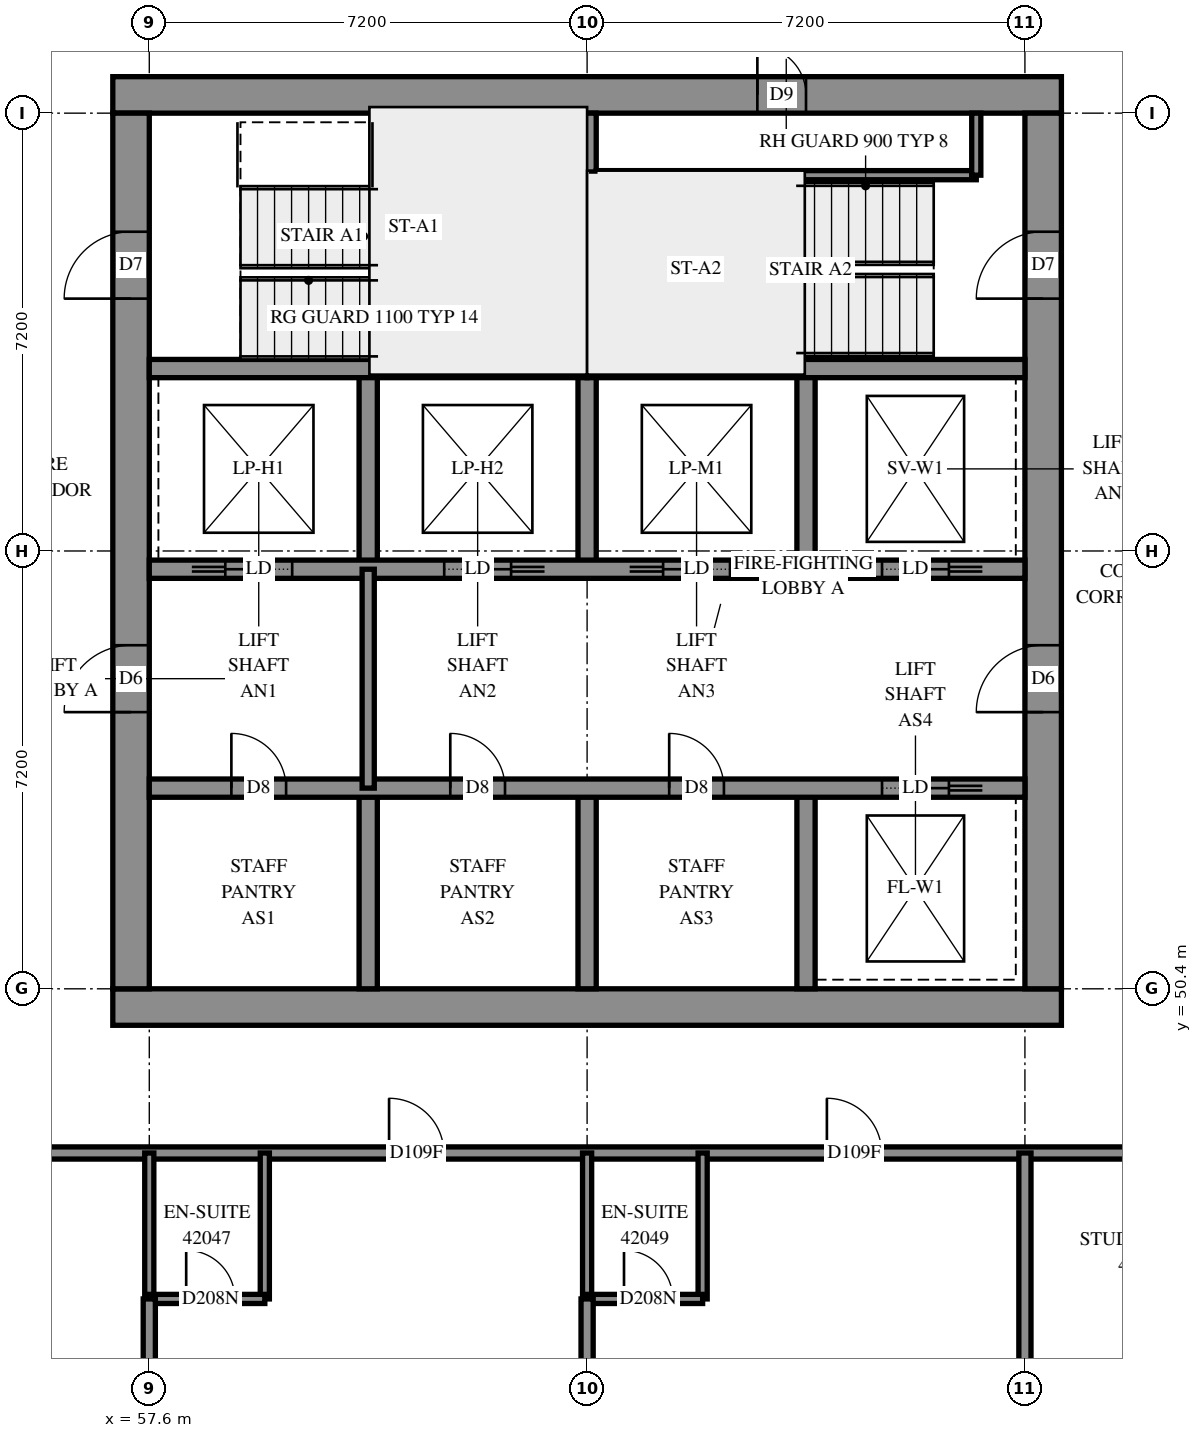
"""IFC4 building model, lengths in metres.
Left out: names, types, materials, properties, quantities, classifications, styles, units other than length and angle.
Written with IfcOpenShell. Run it as: python <this file> out.ifc"""

import sys

from ifc_helpers import new_model, si_unit, direction, frame, frame_2d, origin, place, context, subcontext, project, spatial, rectangle, extrude, element, fill, save


model = new_model("IFC4")
c1 = context("Model", 3, precision=1e-05, world=origin(), true_north=direction((0.0, 1.0)))
c2 = subcontext(c1, "Body", "Model", "MODEL_VIEW")
j1 = project(units=[si_unit("LENGTHUNIT", "METRE"), si_unit("PLANEANGLEUNIT", "RADIAN")], contexts=[c1])
p1 = place(None, origin())
s1 = spatial("IfcSite", under=j1, at=p1, CompositionType="ELEMENT")
p2 = place(p1, origin())
s2 = spatial("IfcBuilding", under=s1, at=p2, CompositionType="ELEMENT")
p3 = place(p2, frame((0.0, 0.0, 155.8)))
s3 = spatial("IfcBuildingStorey", under=s2, at=p3, CompositionType="ELEMENT", Elevation=155.8)
p4 = place(p3, frame((57.0, 50.1, -0.3), z_axis=(0.0, 0.0, 1.0), x_axis=(1.0, 0.0, 0.0)))
e1 = element("IfcWall", 1, at=p4, inside=s3, PredefinedType="SHEAR", context=c2, shape_type="SweptSolid", body=[
    extrude(rectangle(XDim=15.6, YDim=0.6, at=frame_2d((7.8, 0.0))), origin(), (0.0, 0.0, 1.0), 2.7),
])
p5 = place(p3, frame((57.0, 65.1, -0.3), z_axis=(0.0, 0.0, 1.0), x_axis=(1.0, 0.0, 0.0)))
e2 = element("IfcWall", 2, at=p5, inside=s3, PredefinedType="SHEAR", context=c2, shape_type="SweptSolid", body=[
    extrude(rectangle(XDim=15.6, YDim=0.6, at=frame_2d((7.8, 0.0))), origin(), (0.0, 0.0, 1.0), 2.7),
])
p6 = place(p5, frame((10.6, 0.0, 0.3)))
e3 = element("IfcOpeningElement", 3, at=p6, cuts=e2, PredefinedType="OPENING", context=c2, shape_type="SweptSolid", body=[
    extrude(rectangle(XDim=0.8, YDim=2.1, at=frame_2d((0.4, 1.05))), frame((0.0, 0.31, 0.0), z_axis=(0.0, -1.0, 0.0), x_axis=(1.0, 0.0, 0.0)), (0.0, 0.0, 1.0), 0.62),
])
p7 = place(p3, frame((57.3, 50.4, -0.3), z_axis=(0.0, 0.0, 1.0), x_axis=(0.0, 1.0, 0.0)))
e4 = element("IfcWall", 4, at=p7, inside=s3, PredefinedType="SHEAR", context=c2, shape_type="SweptSolid", body=[
    extrude(rectangle(XDim=14.4, YDim=0.6, at=frame_2d((7.2, 0.0))), origin(), (0.0, 0.0, 1.0), 2.7),
])
p8 = place(p7, frame((4.55, 0.0, 0.3)))
e5 = element("IfcOpeningElement", 5, at=p8, cuts=e4, PredefinedType="OPENING", context=c2, shape_type="SweptSolid", body=[
    extrude(rectangle(XDim=1.1, YDim=2.1, at=frame_2d((0.55, 1.05))), frame((0.0, 0.31, 0.0), z_axis=(0.0, -1.0, 0.0), x_axis=(1.0, 0.0, 0.0)), (0.0, 0.0, 1.0), 0.62),
])
p9 = place(p7, frame((11.35, 0.0, 0.3)))
e6 = element("IfcOpeningElement", 6, at=p9, cuts=e4, PredefinedType="OPENING", context=c2, shape_type="SweptSolid", body=[
    extrude(rectangle(XDim=1.1, YDim=2.1, at=frame_2d((0.55, 1.05))), frame((0.0, 0.31, 0.0), z_axis=(0.0, -1.0, 0.0), x_axis=(1.0, 0.0, 0.0)), (0.0, 0.0, 1.0), 0.62),
])
p10 = place(p3, frame((72.3, 50.4, -0.3), z_axis=(0.0, 0.0, 1.0), x_axis=(0.0, 1.0, 0.0)))
e7 = element("IfcWall", 7, at=p10, inside=s3, PredefinedType="SHEAR", context=c2, shape_type="SweptSolid", body=[
    extrude(rectangle(XDim=14.4, YDim=0.6, at=frame_2d((7.2, 0.0))), origin(), (0.0, 0.0, 1.0), 2.7),
])
p11 = place(p10, frame((4.55, 0.0, 0.3)))
e8 = element("IfcOpeningElement", 8, at=p11, cuts=e7, PredefinedType="OPENING", context=c2, shape_type="SweptSolid", body=[
    extrude(rectangle(XDim=1.1, YDim=2.1, at=frame_2d((0.55, 1.05))), frame((0.0, 0.31, 0.0), z_axis=(0.0, -1.0, 0.0), x_axis=(1.0, 0.0, 0.0)), (0.0, 0.0, 1.0), 0.62),
])
p12 = place(p10, frame((11.35, 0.0, 0.3)))
e9 = element("IfcOpeningElement", 9, at=p12, cuts=e7, PredefinedType="OPENING", context=c2, shape_type="SweptSolid", body=[
    extrude(rectangle(XDim=1.1, YDim=2.1, at=frame_2d((0.55, 1.05))), frame((0.0, 0.31, 0.0), z_axis=(0.0, -1.0, 0.0), x_axis=(1.0, 0.0, 0.0)), (0.0, 0.0, 1.0), 0.62),
])
for number, where, z_axis, x_axis in (
    (10, (61.2, 50.4, 0.0), (0.0, 0.0, 1.0), (0.0, 1.0, 0.0)),
    (11, (61.2, 57.3, 0.0), (0.0, 0.0, 1.0), (0.0, 1.0, 0.0)),
    (12, (64.8, 50.4, 0.0), (0.0, 0.0, 1.0), (0.0, 1.0, 0.0)),
    (13, (64.8, 57.3, 0.0), (0.0, 0.0, 1.0), (0.0, 1.0, 0.0)),
    (14, (68.4, 50.4, 0.0), (0.0, 0.0, 1.0), (0.0, 1.0, 0.0)),
    (15, (68.4, 57.3, 0.0), (0.0, 0.0, 1.0), (0.0, 1.0, 0.0)),
):
    element("IfcWall", number, at=place(p3, frame(where, z_axis=z_axis, x_axis=x_axis)), inside=s3, PredefinedType="SOLIDWALL", context=c2, shape_type="SweptSolid", body=[
        extrude(rectangle(XDim=3.3, YDim=0.3, at=frame_2d((1.65, 0.0))), origin(), (0.0, 0.0, 1.0), 3.1),
    ])
p13 = place(p3, frame((57.6, 53.7, 0.0), z_axis=(0.0, 0.0, 1.0), x_axis=(1.0, 0.0, 0.0)))
e16 = element("IfcWall", 16, at=p13, inside=s3, PredefinedType="SOLIDWALL", context=c2, shape_type="SweptSolid", body=[
    extrude(rectangle(XDim=14.4, YDim=0.3, at=frame_2d((7.2, 0.0))), origin(), (0.0, 0.0, 1.0), 3.1),
])
p14 = place(p13, frame((1.35, 0.0, 0.0)))
e17 = element("IfcOpeningElement", 17, at=p14, cuts=e16, PredefinedType="OPENING", context=c2, shape_type="SweptSolid", body=[
    extrude(rectangle(XDim=0.9, YDim=2.1, at=frame_2d((0.45, 1.05))), frame((0.0, 0.16, 0.0), z_axis=(0.0, -1.0, 0.0), x_axis=(1.0, 0.0, 0.0)), (0.0, 0.0, 1.0), 0.32),
])
p15 = place(p13, frame((4.95, 0.0, 0.0)))
e18 = element("IfcOpeningElement", 18, at=p15, cuts=e16, PredefinedType="OPENING", context=c2, shape_type="SweptSolid", body=[
    extrude(rectangle(XDim=0.9, YDim=2.1, at=frame_2d((0.45, 1.05))), frame((0.0, 0.16, 0.0), z_axis=(0.0, -1.0, 0.0), x_axis=(1.0, 0.0, 0.0)), (0.0, 0.0, 1.0), 0.32),
])
p16 = place(p13, frame((8.55, 0.0, 0.0)))
e19 = element("IfcOpeningElement", 19, at=p16, cuts=e16, PredefinedType="OPENING", context=c2, shape_type="SweptSolid", body=[
    extrude(rectangle(XDim=0.9, YDim=2.1, at=frame_2d((0.45, 1.05))), frame((0.0, 0.16, 0.0), z_axis=(0.0, -1.0, 0.0), x_axis=(1.0, 0.0, 0.0)), (0.0, 0.0, 1.0), 0.32),
])
p17 = place(p13, frame((12.05, 0.0, 0.0)))
e20 = element("IfcOpeningElement", 20, at=p17, cuts=e16, PredefinedType="OPENING", context=c2, shape_type="SweptSolid", body=[
    extrude(rectangle(XDim=1.1, YDim=2.1, at=frame_2d((0.55, 1.05))), frame((0.0, 0.16, 0.0), z_axis=(0.0, -1.0, 0.0), x_axis=(1.0, 0.0, 0.0)), (0.0, 0.0, 1.0), 0.32),
])
p18 = place(p3, frame((57.6, 57.3, 0.0), z_axis=(0.0, 0.0, 1.0), x_axis=(1.0, 0.0, 0.0)))
e21 = element("IfcWall", 21, at=p18, inside=s3, PredefinedType="SOLIDWALL", context=c2, shape_type="SweptSolid", body=[
    extrude(rectangle(XDim=14.4, YDim=0.3, at=frame_2d((7.2, 0.0))), origin(), (0.0, 0.0, 1.0), 3.1),
])
p19 = place(p18, frame((1.25, 0.0, 0.0)))
e22 = element("IfcOpeningElement", 22, at=p19, cuts=e21, PredefinedType="OPENING", context=c2, shape_type="SweptSolid", body=[
    extrude(rectangle(XDim=1.1, YDim=2.1, at=frame_2d((0.55, 1.05))), frame((0.0, 0.16, 0.0), z_axis=(0.0, -1.0, 0.0), x_axis=(1.0, 0.0, 0.0)), (0.0, 0.0, 1.0), 0.32),
])
p20 = place(p18, frame((4.85, 0.0, 0.0)))
e23 = element("IfcOpeningElement", 23, at=p20, cuts=e21, PredefinedType="OPENING", context=c2, shape_type="SweptSolid", body=[
    extrude(rectangle(XDim=1.1, YDim=2.1, at=frame_2d((0.55, 1.05))), frame((0.0, 0.16, 0.0), z_axis=(0.0, -1.0, 0.0), x_axis=(1.0, 0.0, 0.0)), (0.0, 0.0, 1.0), 0.32),
])
p21 = place(p18, frame((8.45, 0.0, 0.0)))
e24 = element("IfcOpeningElement", 24, at=p21, cuts=e21, PredefinedType="OPENING", context=c2, shape_type="SweptSolid", body=[
    extrude(rectangle(XDim=1.1, YDim=2.1, at=frame_2d((0.55, 1.05))), frame((0.0, 0.16, 0.0), z_axis=(0.0, -1.0, 0.0), x_axis=(1.0, 0.0, 0.0)), (0.0, 0.0, 1.0), 0.32),
])
p22 = place(p18, frame((12.05, 0.0, 0.0)))
e25 = element("IfcOpeningElement", 25, at=p22, cuts=e21, PredefinedType="OPENING", context=c2, shape_type="SweptSolid", body=[
    extrude(rectangle(XDim=1.1, YDim=2.1, at=frame_2d((0.55, 1.05))), frame((0.0, 0.16, 0.0), z_axis=(0.0, -1.0, 0.0), x_axis=(1.0, 0.0, 0.0)), (0.0, 0.0, 1.0), 0.32),
])
for number, where, z_axis, x_axis in (
    (26, (57.6, 60.6, 0.0), (0.0, 0.0, 1.0), (1.0, 0.0, 0.0)),
    (27, (64.8, 60.6, 0.0), (0.0, 0.0, 1.0), (1.0, 0.0, 0.0)),
):
    element("IfcWall", number, at=place(p3, frame(where, z_axis=z_axis, x_axis=x_axis)), inside=s3, PredefinedType="SOLIDWALL", context=c2, shape_type="SweptSolid", body=[
        extrude(rectangle(XDim=7.2, YDim=0.3, at=frame_2d((3.6, 0.0))), origin(), (0.0, 0.0, 1.0), 3.1),
    ])
p23 = place(p3, frame((64.8, 60.6, 0.0), z_axis=(0.0, 0.0, 1.0), x_axis=(0.0, 1.0, 0.0)))
e28 = element("IfcWall", 28, at=p23, inside=s3, PredefinedType="SOLIDWALL", context=c2, shape_type="SweptSolid", body=[
    extrude(rectangle(XDim=4.2, YDim=0.3, at=frame_2d((2.1, 0.0))), origin(), (0.0, 0.0, 1.0), 3.1),
])
p24 = place(p3, frame((64.95, 63.78, 0.0), z_axis=(0.0, 0.0, 1.0), x_axis=(1.0, 0.0, 0.0)))
e29 = element("IfcWall", 29, at=p24, inside=s3, PredefinedType="PARTITIONING", context=c2, shape_type="SweptSolid", body=[
    extrude(rectangle(XDim=6.25, YDim=0.15, at=frame_2d((3.125, 0.0))), origin(), (0.0, 0.0, 1.0), 3.1),
])
p25 = place(p3, frame((71.2, 63.78, 0.0), z_axis=(0.0, 0.0, 1.0), x_axis=(0.0, 1.0, 0.0)))
e30 = element("IfcWall", 30, at=p25, inside=s3, PredefinedType="PARTITIONING", context=c2, shape_type="SweptSolid", body=[
    extrude(rectangle(XDim=1.02, YDim=0.15, at=frame_2d((0.51, 0.0))), origin(), (0.0, 0.0, 1.0), 3.1),
])
p26 = place(p3, frame((61.2, 53.7, 0.0), z_axis=(0.0, 0.0, 1.0), x_axis=(0.0, 1.0, 0.0)))
e31 = element("IfcWall", 31, at=p26, inside=s3, PredefinedType="PARTITIONING", context=c2, shape_type="SweptSolid", body=[
    extrude(rectangle(XDim=3.6, YDim=0.2, at=frame_2d((1.8, 0.0))), origin(), (0.0, 0.0, 1.0), 3.1),
])
p27 = place(p3, frame((54.9, 47.7, 0.0), z_axis=(0.0, 0.0, 1.0), x_axis=(1.0, 0.0, 0.0)))
e32 = element("IfcWall", 32, at=p27, inside=s3, PredefinedType="PARTITIONING", context=c2, shape_type="SweptSolid", body=[
    extrude(rectangle(XDim=19.326, YDim=0.2, at=frame_2d((9.663, 0.0))), origin(), (0.0, 0.0, 1.0), 3.1),
])
p28 = place(p27, frame((6.643, 0.0, 0.0)))
e33 = element("IfcOpeningElement", 33, at=p28, cuts=e32, PredefinedType="OPENING", context=c2, shape_type="SweptSolid", body=[
    extrude(rectangle(XDim=0.9, YDim=2.1, at=frame_2d((0.45, 1.05))), frame((0.0, 0.11, 0.0), z_axis=(0.0, -1.0, 0.0), x_axis=(1.0, 0.0, 0.0)), (0.0, 0.0, 1.0), 0.22),
])
p29 = place(p27, frame((13.843, 0.0, 0.0)))
e34 = element("IfcOpeningElement", 34, at=p29, cuts=e32, PredefinedType="OPENING", context=c2, shape_type="SweptSolid", body=[
    extrude(rectangle(XDim=0.9, YDim=2.1, at=frame_2d((0.45, 1.05))), frame((0.0, 0.11, 0.0), z_axis=(0.0, -1.0, 0.0), x_axis=(1.0, 0.0, 0.0)), (0.0, 0.0, 1.0), 0.22),
])
p30 = place(p3, frame((72.0, 43.65, 0.0), z_axis=(0.0, 0.0, 1.0), x_axis=(0.0, 1.0, 0.0)))
e35 = element("IfcWall", 35, at=p30, inside=s3, PredefinedType="PARTITIONING", context=c2, shape_type="SweptSolid", body=[
    extrude(rectangle(XDim=4.05, YDim=0.2, at=frame_2d((2.025, 0.0))), origin(), (0.0, 0.0, 1.0), 3.1),
])
for number, where, z_axis, x_axis in (
    (36, (59.5, 45.3, 0.0), (0.0, 0.0, 1.0), (0.0, 1.0, 0.0)),
    (37, (57.6, 45.3, 0.0), (0.0, 0.0, 1.0), (0.0, 1.0, 0.0)),
    (38, (66.7, 45.3, 0.0), (0.0, 0.0, 1.0), (0.0, 1.0, 0.0)),
    (39, (64.8, 45.3, 0.0), (0.0, 0.0, 1.0), (0.0, 1.0, 0.0)),
):
    element("IfcWall", number, at=place(p3, frame(where, z_axis=z_axis, x_axis=x_axis)), inside=s3, PredefinedType="PARTITIONING", context=c2, shape_type="SweptSolid", body=[
        extrude(rectangle(XDim=2.4, YDim=0.15, at=frame_2d((1.2, 0.0))), origin(), (0.0, 0.0, 1.0), 3.1),
    ])
p31 = place(p3, frame((64.8, 45.3, 0.0), z_axis=(0.0, 0.0, 1.0), x_axis=(1.0, 0.0, 0.0)))
e40 = element("IfcWall", 40, at=p31, inside=s3, PredefinedType="PARTITIONING", context=c2, shape_type="SweptSolid", body=[
    extrude(rectangle(XDim=1.9, YDim=0.15, at=frame_2d((0.95, 0.0))), origin(), (0.0, 0.0, 1.0), 3.1),
])
p32 = place(p31, frame((0.607, 0.0, 0.0)))
e41 = element("IfcOpeningElement", 41, at=p32, cuts=e40, PredefinedType="OPENING", context=c2, shape_type="SweptSolid", body=[
    extrude(rectangle(XDim=0.8, YDim=2.1, at=frame_2d((0.4, 1.05))), frame((0.0, 0.085, 0.0), z_axis=(0.0, -1.0, 0.0), x_axis=(1.0, 0.0, 0.0)), (0.0, 0.0, 1.0), 0.17),
])
p33 = place(p3, frame((57.6, 45.3, 0.0), z_axis=(0.0, 0.0, 1.0), x_axis=(1.0, 0.0, 0.0)))
e42 = element("IfcWall", 42, at=p33, inside=s3, PredefinedType="PARTITIONING", context=c2, shape_type="SweptSolid", body=[
    extrude(rectangle(XDim=1.9, YDim=0.15, at=frame_2d((0.95, 0.0))), origin(), (0.0, 0.0, 1.0), 3.1),
])
p34 = place(p33, frame((0.607, 0.0, 0.0)))
e43 = element("IfcOpeningElement", 43, at=p34, cuts=e42, PredefinedType="OPENING", context=c2, shape_type="SweptSolid", body=[
    extrude(rectangle(XDim=0.8, YDim=2.1, at=frame_2d((0.4, 1.05))), frame((0.0, 0.085, 0.0), z_axis=(0.0, -1.0, 0.0), x_axis=(1.0, 0.0, 0.0)), (0.0, 0.0, 1.0), 0.17),
])
for number, where, z_axis, x_axis in (
    (44, (57.6, 43.65, 0.0), (0.0, 0.0, 1.0), (0.0, 1.0, 0.0)),
    (45, (64.8, 43.65, 0.0), (0.0, 0.0, 1.0), (0.0, 1.0, 0.0)),
):
    element("IfcWall", number, at=place(p3, frame(where, z_axis=z_axis, x_axis=x_axis)), inside=s3, PredefinedType="PARTITIONING", context=c2, shape_type="SweptSolid", body=[
        extrude(rectangle(XDim=1.65, YDim=0.2, at=frame_2d((0.825, 0.0))), origin(), (0.0, 0.0, 1.0), 3.1),
    ])
p35 = place(p6, origin())
e46 = element("IfcDoor", 46, at=p35, inside=s3, OperationType="SINGLE_SWING_RIGHT", PredefinedType="DOOR", context=c2, shape_type="SweptSolid", body=[
    extrude(rectangle(XDim=0.8, YDim=2.1, at=frame_2d((0.4, 1.05))), frame((0.0, 0.025, 0.0), z_axis=(0.0, -1.0, 0.0), x_axis=(1.0, 0.0, 0.0)), (0.0, 0.0, 1.0), 0.05),
])
fill(e3, e46)
p36 = place(p8, origin())
e47 = element("IfcDoor", 47, at=p36, inside=s3, OperationType="DOUBLE_DOOR_SINGLE_SWING", PredefinedType="DOOR", context=c2, shape_type="SweptSolid", body=[
    extrude(rectangle(XDim=1.1, YDim=2.1, at=frame_2d((0.55, 1.05))), frame((0.0, 0.025, 0.0), z_axis=(0.0, -1.0, 0.0), x_axis=(1.0, 0.0, 0.0)), (0.0, 0.0, 1.0), 0.05),
])
fill(e5, e47)
p37 = place(p11, origin())
e48 = element("IfcDoor", 48, at=p37, inside=s3, OperationType="DOUBLE_DOOR_SINGLE_SWING", PredefinedType="DOOR", context=c2, shape_type="SweptSolid", body=[
    extrude(rectangle(XDim=1.1, YDim=2.1, at=frame_2d((0.55, 1.05))), frame((0.0, 0.025, 0.0), z_axis=(0.0, -1.0, 0.0), x_axis=(1.0, 0.0, 0.0)), (0.0, 0.0, 1.0), 0.05),
])
fill(e8, e48)
p38 = place(p9, origin())
e49 = element("IfcDoor", 49, at=p38, inside=s3, OperationType="SINGLE_SWING_LEFT", PredefinedType="DOOR", context=c2, shape_type="SweptSolid", body=[
    extrude(rectangle(XDim=1.1, YDim=2.1, at=frame_2d((0.55, 1.05))), frame((0.0, 0.025, 0.0), z_axis=(0.0, -1.0, 0.0), x_axis=(1.0, 0.0, 0.0)), (0.0, 0.0, 1.0), 0.05),
])
fill(e6, e49)
p39 = place(p12, origin())
e50 = element("IfcDoor", 50, at=p39, inside=s3, OperationType="SINGLE_SWING_RIGHT", PredefinedType="DOOR", context=c2, shape_type="SweptSolid", body=[
    extrude(rectangle(XDim=1.1, YDim=2.1, at=frame_2d((0.55, 1.05))), frame((0.0, 0.025, 0.0), z_axis=(0.0, -1.0, 0.0), x_axis=(1.0, 0.0, 0.0)), (0.0, 0.0, 1.0), 0.05),
])
fill(e9, e50)
p40 = place(p14, origin())
e51 = element("IfcDoor", 51, at=p40, inside=s3, OperationType="SINGLE_SWING_LEFT", PredefinedType="DOOR", context=c2, shape_type="SweptSolid", body=[
    extrude(rectangle(XDim=0.9, YDim=2.1, at=frame_2d((0.45, 1.05))), frame((0.0, 0.025, 0.0), z_axis=(0.0, -1.0, 0.0), x_axis=(1.0, 0.0, 0.0)), (0.0, 0.0, 1.0), 0.05),
])
fill(e17, e51)
p41 = place(p15, origin())
e52 = element("IfcDoor", 52, at=p41, inside=s3, OperationType="SINGLE_SWING_LEFT", PredefinedType="DOOR", context=c2, shape_type="SweptSolid", body=[
    extrude(rectangle(XDim=0.9, YDim=2.1, at=frame_2d((0.45, 1.05))), frame((0.0, 0.025, 0.0), z_axis=(0.0, -1.0, 0.0), x_axis=(1.0, 0.0, 0.0)), (0.0, 0.0, 1.0), 0.05),
])
fill(e18, e52)
p42 = place(p16, origin())
e53 = element("IfcDoor", 53, at=p42, inside=s3, OperationType="SINGLE_SWING_LEFT", PredefinedType="DOOR", context=c2, shape_type="SweptSolid", body=[
    extrude(rectangle(XDim=0.9, YDim=2.1, at=frame_2d((0.45, 1.05))), frame((0.0, 0.025, 0.0), z_axis=(0.0, -1.0, 0.0), x_axis=(1.0, 0.0, 0.0)), (0.0, 0.0, 1.0), 0.05),
])
fill(e19, e53)
p43 = place(p17, origin())
e54 = element("IfcDoor", 54, at=p43, inside=s3, OperationType="SLIDING_TO_RIGHT", PredefinedType="DOOR", context=c2, shape_type="SweptSolid", body=[
    extrude(rectangle(XDim=1.1, YDim=2.1, at=frame_2d((0.55, 1.05))), frame((0.0, 0.025, 0.0), z_axis=(0.0, -1.0, 0.0), x_axis=(1.0, 0.0, 0.0)), (0.0, 0.0, 1.0), 0.05),
])
fill(e20, e54)
p44 = place(p19, origin())
e55 = element("IfcDoor", 55, at=p44, inside=s3, OperationType="SLIDING_TO_LEFT", PredefinedType="DOOR", context=c2, shape_type="SweptSolid", body=[
    extrude(rectangle(XDim=1.1, YDim=2.1, at=frame_2d((0.55, 1.05))), frame((0.0, 0.025, 0.0), z_axis=(0.0, -1.0, 0.0), x_axis=(1.0, 0.0, 0.0)), (0.0, 0.0, 1.0), 0.05),
])
fill(e22, e55)
p45 = place(p20, origin())
e56 = element("IfcDoor", 56, at=p45, inside=s3, OperationType="SLIDING_TO_RIGHT", PredefinedType="DOOR", context=c2, shape_type="SweptSolid", body=[
    extrude(rectangle(XDim=1.1, YDim=2.1, at=frame_2d((0.55, 1.05))), frame((0.0, 0.025, 0.0), z_axis=(0.0, -1.0, 0.0), x_axis=(1.0, 0.0, 0.0)), (0.0, 0.0, 1.0), 0.05),
])
fill(e23, e56)
p46 = place(p21, origin())
e57 = element("IfcDoor", 57, at=p46, inside=s3, OperationType="SLIDING_TO_LEFT", PredefinedType="DOOR", context=c2, shape_type="SweptSolid", body=[
    extrude(rectangle(XDim=1.1, YDim=2.1, at=frame_2d((0.55, 1.05))), frame((0.0, 0.025, 0.0), z_axis=(0.0, -1.0, 0.0), x_axis=(1.0, 0.0, 0.0)), (0.0, 0.0, 1.0), 0.05),
])
fill(e24, e57)
p47 = place(p22, origin())
e58 = element("IfcDoor", 58, at=p47, inside=s3, OperationType="SLIDING_TO_RIGHT", PredefinedType="DOOR", context=c2, shape_type="SweptSolid", body=[
    extrude(rectangle(XDim=1.1, YDim=2.1, at=frame_2d((0.55, 1.05))), frame((0.0, 0.025, 0.0), z_axis=(0.0, -1.0, 0.0), x_axis=(1.0, 0.0, 0.0)), (0.0, 0.0, 1.0), 0.05),
])
fill(e25, e58)
p48 = place(p28, origin())
e59 = element("IfcDoor", 59, at=p48, inside=s3, OperationType="SINGLE_SWING_LEFT", PredefinedType="DOOR", context=c2, shape_type="SweptSolid", body=[
    extrude(rectangle(XDim=0.9, YDim=2.1, at=frame_2d((0.45, 1.05))), frame((0.0, 0.025, 0.0), z_axis=(0.0, -1.0, 0.0), x_axis=(1.0, 0.0, 0.0)), (0.0, 0.0, 1.0), 0.05),
])
fill(e33, e59)
p49 = place(p34, origin())
e60 = element("IfcDoor", 60, at=p49, inside=s3, OperationType="SINGLE_SWING_RIGHT", PredefinedType="DOOR", context=c2, shape_type="SweptSolid", body=[
    extrude(rectangle(XDim=0.8, YDim=2.1, at=frame_2d((0.4, 1.05))), frame((0.0, 0.025, 0.0), z_axis=(0.0, -1.0, 0.0), x_axis=(1.0, 0.0, 0.0)), (0.0, 0.0, 1.0), 0.05),
])
fill(e43, e60)
p50 = place(p29, origin())
e61 = element("IfcDoor", 61, at=p50, inside=s3, OperationType="SINGLE_SWING_LEFT", PredefinedType="DOOR", context=c2, shape_type="SweptSolid", body=[
    extrude(rectangle(XDim=0.9, YDim=2.1, at=frame_2d((0.45, 1.05))), frame((0.0, 0.025, 0.0), z_axis=(0.0, -1.0, 0.0), x_axis=(1.0, 0.0, 0.0)), (0.0, 0.0, 1.0), 0.05),
])
fill(e34, e61)
p51 = place(p32, origin())
e62 = element("IfcDoor", 62, at=p51, inside=s3, OperationType="SINGLE_SWING_RIGHT", PredefinedType="DOOR", context=c2, shape_type="SweptSolid", body=[
    extrude(rectangle(XDim=0.8, YDim=2.1, at=frame_2d((0.4, 1.05))), frame((0.0, 0.025, 0.0), z_axis=(0.0, -1.0, 0.0), x_axis=(1.0, 0.0, 0.0)), (0.0, 0.0, 1.0), 0.05),
])
fill(e41, e62)
save(model, sys.argv[1])
